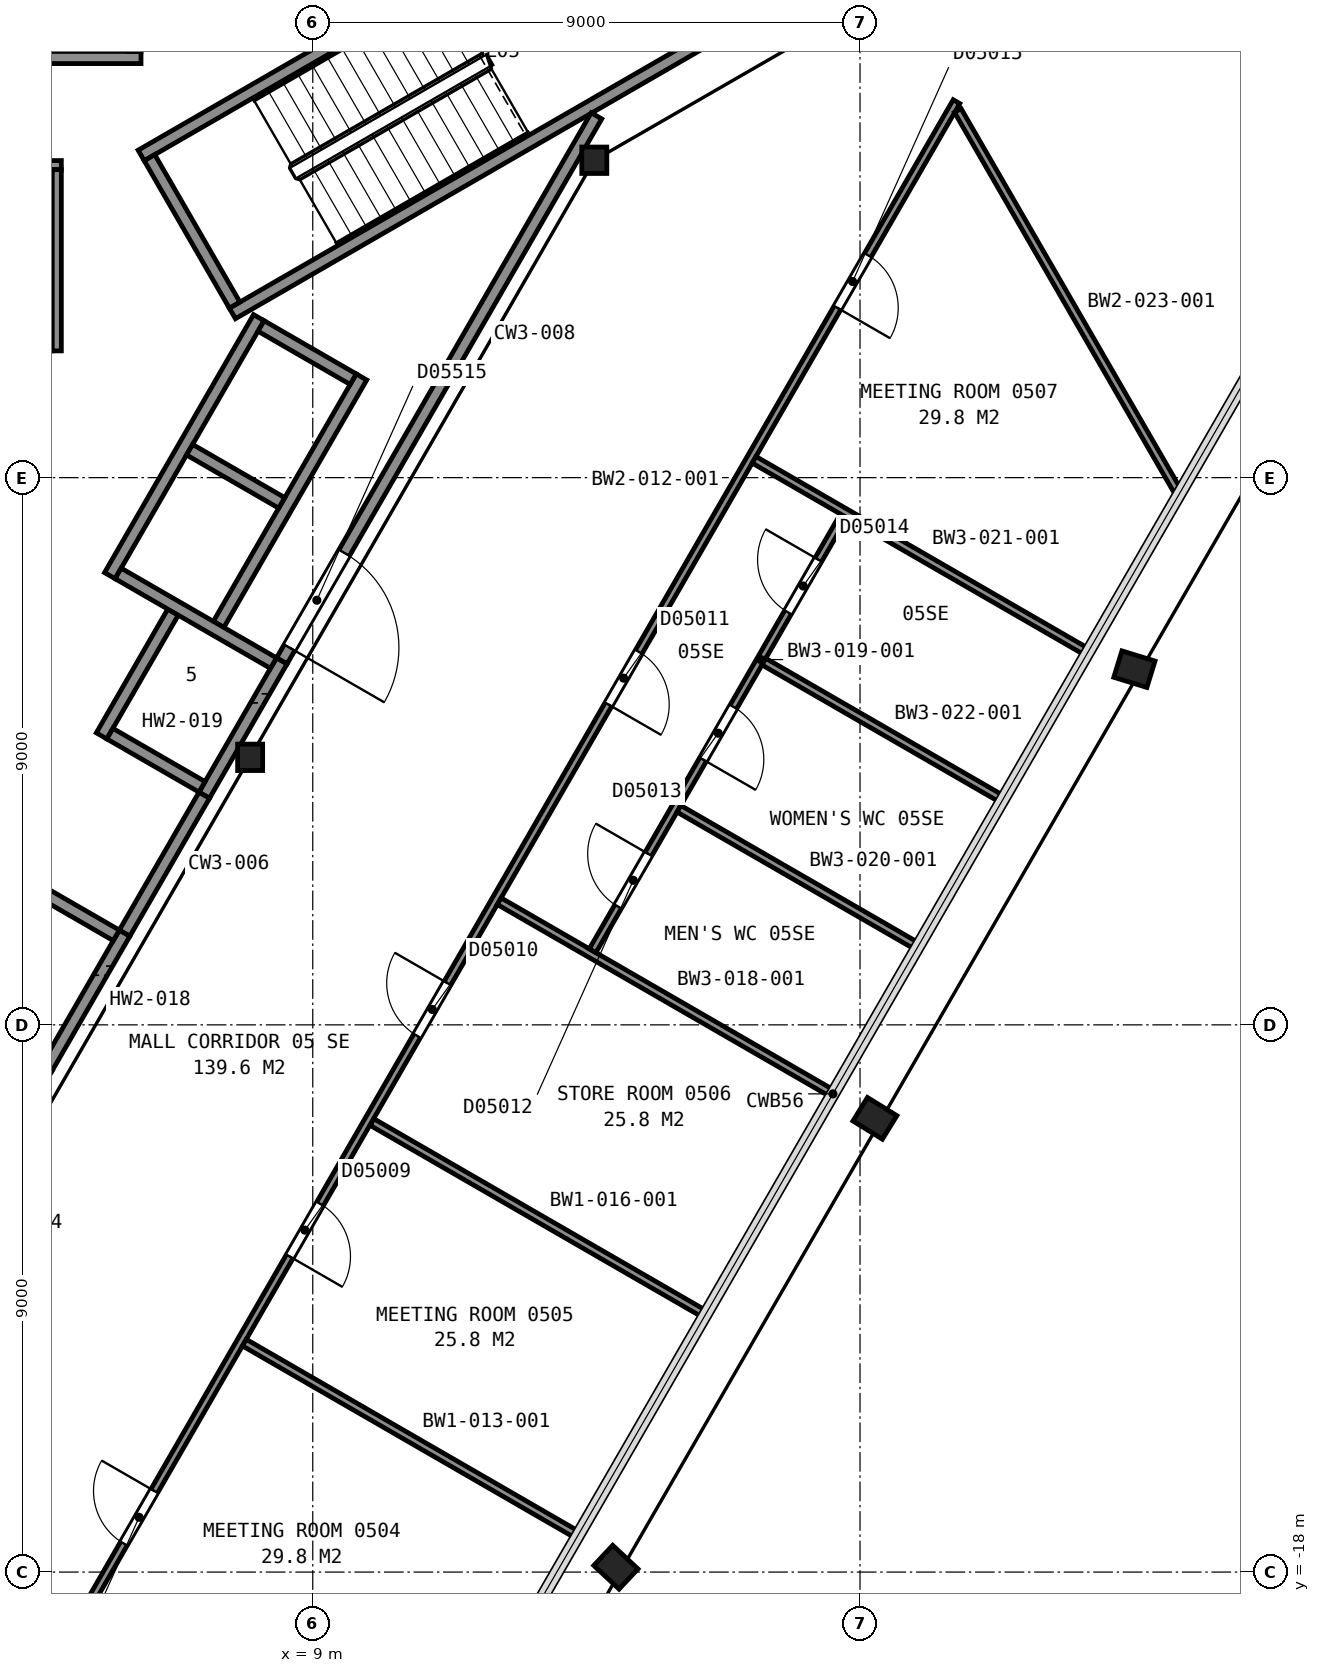
"""IFC4 building model, lengths in metres.
Left out: names, types, materials, properties, quantities, classifications, styles, units other than length and angle.
Written with IfcOpenShell. Run it as: python <this file> out.ifc"""

import sys

from ifc_helpers import new_model, si_unit, direction, frame, frame_2d, origin, origin_2d, place, context, subcontext, project, spatial, rectangle, i_section, extrude, element, fill, save


model = new_model("IFC4")
c1 = context("Model", 3, precision=1e-05, world=origin(), true_north=direction((0.0, 1.0)))
c2 = subcontext(c1, "Body", "Model", "MODEL_VIEW")
j1 = project(units=[si_unit("LENGTHUNIT", "METRE"), si_unit("PLANEANGLEUNIT", "RADIAN")], contexts=[c1])
p1 = place(None, origin())
s1 = spatial("IfcSite", under=j1, at=p1, CompositionType="ELEMENT")
p2 = place(p1, origin())
s2 = spatial("IfcBuilding", under=s1, at=p2, CompositionType="ELEMENT")
p3 = place(p2, frame((0.0, 0.0, 32.0)))
s3 = spatial("IfcBuildingStorey", under=s2, at=p3, CompositionType="ELEMENT", Elevation=32.0)
p4 = place(p3, frame((14.058, -17.989, 0.025), z_axis=(-0.062221812166, 0.058124902723, 0.996368376543), x_axis=(-0.500286642151, -0.865645685463, 0.019256763096)))
e1 = element("IfcColumn", 1, at=p4, inside=s3, PredefinedType="COLUMN", context=c2, shape_type="SweptSolid", body=[
    extrude(i_section(OverallWidth=0.455, OverallDepth=0.569, WebThickness=0.078, FlangeThickness=0.125, FilletRadius=0.015, at=origin_2d()), origin(), (0.0, 0.0, 1.0), 4.767),
])
p5 = place(p3, frame((18.328, -10.589, 0.025), z_axis=(-0.070582350376, 0.043588955131, 0.996553126936), x_axis=(-0.499945117104, -0.866053561357, 0.002471587651)))
e2 = element("IfcColumn", 2, at=p5, inside=s3, PredefinedType="COLUMN", context=c2, shape_type="SweptSolid", body=[
    extrude(i_section(OverallWidth=0.455, OverallDepth=0.569, WebThickness=0.078, FlangeThickness=0.125, FilletRadius=0.015, at=origin_2d()), origin(), (0.0, 0.0, 1.0), 4.766),
])
p6 = place(p3, frame((22.608, -3.179, 0.025), z_axis=(-0.080968116055, 0.024940842833, 0.996404595805), x_axis=(-0.500178646621, -0.865714310263, -0.018975101316)))
e3 = element("IfcColumn", 3, at=p6, inside=s3, PredefinedType="COLUMN", context=c2, shape_type="SweptSolid", body=[
    extrude(i_section(OverallWidth=0.455, OverallDepth=0.569, WebThickness=0.078, FlangeThickness=0.125, FilletRadius=0.015, at=origin_2d()), origin(), (0.0, 0.0, 1.0), 4.767),
])
for number, where, z_axis, x_axis in (
    (4, (13.63, 5.22, 0.0), (0.0, 0.0, 1.0), (1.0, 0.0, 0.0)),
    (5, (7.97, -4.6, 0.0), (0.0, 0.0, 1.0), (1.0, 0.0, 0.0)),
):
    element("IfcColumn", number, at=place(p3, frame(where, z_axis=z_axis, x_axis=x_axis)), inside=s3, PredefinedType="COLUMN", context=c2, shape_type="SweptSolid", body=[
        extrude(i_section(OverallWidth=0.411, OverallDepth=0.434, WebThickness=0.036, FlangeThickness=0.057, FilletRadius=0.015, at=origin_2d()), origin(), (0.0, 0.0, 1.0), 4.8),
    ])
for number, where, z_axis, x_axis in (
    (6, (6.178, 5.299, 0.0), (0.0, 0.0, 1.0), (0.866, 0.5, 0.0)),
    (7, (7.678, 2.701, 0.0), (0.0, 0.0, 1.0), (0.866, 0.5, 0.0)),
):
    element("IfcWall", number, at=place(p3, frame(where, z_axis=z_axis, x_axis=x_axis)), inside=s3, PredefinedType="PARTITIONING", context=c2, shape_type="SweptSolid", body=[
        extrude(rectangle(XDim=12.0, YDim=0.2, at=frame_2d((6.0, 0.0))), origin(), (0.0, 0.0, 1.0), 4.55),
    ])
p7 = place(p3, frame((7.715, 2.838, 0.0), z_axis=(0.0, 0.0, 1.0), x_axis=(-0.500049511043, 0.865996816683, 0.0)))
e8 = element("IfcWall", 8, at=p7, inside=s3, PredefinedType="PARTITIONING", context=c2, shape_type="SweptSolid", body=[
    extrude(rectangle(XDim=2.8, YDim=0.2, at=frame_2d((1.4, 0.0))), origin(), (0.0, 0.0, 1.0), 4.55),
])
for number, where, z_axis, x_axis in (
    (9, (3.625, 6.91, 0.0), (0.0, 0.0, 1.0), (1.0, 0.0, 0.0)),
    (10, (4.63, -9.7, 0.0), (0.0, 0.0, 1.0), (0.5, 0.866, 0.0)),
):
    element("IfcWall", number, at=place(p3, frame(where, z_axis=z_axis, x_axis=x_axis)), inside=s3, PredefinedType="PARTITIONING", context=c2, shape_type="SweptSolid", body=[
        extrude(rectangle(XDim=2.55, YDim=0.2, at=frame_2d((1.275, 0.0))), origin(), (0.0, 0.0, 1.0), 4.8),
    ])
p8 = place(p3, frame((7.216, -5.222, 0.0), z_axis=(0.0, 0.0, 1.0), x_axis=(0.499990435942, 0.866030925526, 0.0)))
e11 = element("IfcWall", 11, at=p8, inside=s3, PredefinedType="PARTITIONING", context=c2, shape_type="SweptSolid", body=[
    extrude(rectangle(XDim=2.55, YDim=0.2, at=frame_2d((1.275, 0.0))), origin(), (0.0, 0.0, 1.0), 4.8),
])
p9 = place(p3, frame((7.451, -2.414, 0.0), z_axis=(0.0, 0.0, 1.0), x_axis=(0.500016218704, 0.866016039709, 0.0)))
e12 = element("IfcWall", 12, at=p9, inside=s3, PredefinedType="PARTITIONING", context=c2, shape_type="SweptSolid", body=[
    extrude(rectangle(XDim=4.7, YDim=0.2, at=frame_2d((2.35, 0.0))), origin(), (0.0, 0.0, 1.0), 4.8),
])
p10 = place(p3, frame((5.527, -4.247, 0.0), z_axis=(0.0, 0.0, 1.0), x_axis=(0.499938297808, 0.866061024631, 0.0)))
e13 = element("IfcWall", 13, at=p10, inside=s3, PredefinedType="PARTITIONING", context=c2, shape_type="SweptSolid", body=[
    extrude(rectangle(XDim=2.35, YDim=0.2, at=frame_2d((1.175, 0.0))), origin(), (0.0, 0.0, 1.0), 4.8),
])
p11 = place(p3, frame((5.663, -1.612, 0.0), z_axis=(0.0, 0.0, 1.0), x_axis=(0.49998122708, 0.866036242063, 0.0)))
e14 = element("IfcWall", 14, at=p11, inside=s3, PredefinedType="PARTITIONING", context=c2, shape_type="SweptSolid", body=[
    extrude(rectangle(XDim=4.9, YDim=0.2, at=frame_2d((2.45, 0.0))), origin(), (0.0, 0.0, 1.0), 4.8),
])
p12 = place(p3, frame((9.665, 1.62, 0.0), z_axis=(0.0, 0.0, 1.0), x_axis=(-0.866002029911, 0.500040482552, 0.0)))
e15 = element("IfcWall", 15, at=p12, inside=s3, PredefinedType="PARTITIONING", context=c2, shape_type="SweptSolid", body=[
    extrude(rectangle(XDim=1.75, YDim=0.2, at=frame_2d((0.875, 0.0))), origin(), (0.0, 0.0, 1.0), 4.8),
])
p13 = place(p3, frame((8.49, -0.416, 0.0), z_axis=(0.0, 0.0, 1.0), x_axis=(-0.866036909293, 0.499980071345, 0.0)))
e16 = element("IfcWall", 16, at=p13, inside=s3, PredefinedType="PARTITIONING", context=c2, shape_type="SweptSolid", body=[
    extrude(rectangle(XDim=1.75, YDim=0.2, at=frame_2d((0.875, 0.0))), origin(), (0.0, 0.0, 1.0), 4.8),
])
p14 = place(p3, frame((8.354, -3.051, 0.0), z_axis=(0.0, 0.0, 1.0), x_axis=(-0.866060182126, 0.499939757307, 0.0)))
e17 = element("IfcWall", 17, at=p14, inside=s3, PredefinedType="PARTITIONING", context=c2, shape_type="SweptSolid", body=[
    extrude(rectangle(XDim=2.95, YDim=0.2, at=frame_2d((1.475, 0.0))), origin(), (0.0, 0.0, 1.0), 4.8),
])
p15 = place(p3, frame((7.179, -5.086, 0.0), z_axis=(0.0, 0.0, 1.0), x_axis=(-0.866036909293, 0.499980071345, 0.0)))
e18 = element("IfcWall", 18, at=p15, inside=s3, PredefinedType="PARTITIONING", context=c2, shape_type="SweptSolid", body=[
    extrude(rectangle(XDim=1.75, YDim=0.2, at=frame_2d((0.875, 0.0))), origin(), (0.0, 0.0, 1.0), 4.8),
])
p16 = place(p3, frame((5.769, -7.528, 0.0), z_axis=(0.0, 0.0, 1.0), x_axis=(-0.866002029911, 0.500040482552, 0.0)))
e19 = element("IfcWall", 19, at=p16, inside=s3, PredefinedType="PARTITIONING", context=c2, shape_type="SweptSolid", body=[
    extrude(rectangle(XDim=1.75, YDim=0.2, at=frame_2d((0.875, 0.0))), origin(), (0.0, 0.0, 1.0), 4.8),
])
p17 = place(p3, frame((-0.245, 5.14, 0.0), z_axis=(0.0, 0.0, 1.0), x_axis=(1.0, 0.0, 0.0)))
e20 = element("IfcWall", 20, at=p17, inside=s3, PredefinedType="PARTITIONING", context=c2, shape_type="SweptSolid", body=[
    extrude(rectangle(XDim=5.11, YDim=0.15, at=frame_2d((2.555, 0.0))), origin(), (0.0, 0.0, 1.0), 4.55),
])
p18 = place(p17, frame((1.975, 0.0, 0.0)))
e21 = element("IfcOpeningElement", 21, at=p18, cuts=e20, PredefinedType="OPENING", context=c2, shape_type="SweptSolid", body=[
    extrude(rectangle(XDim=1.0, YDim=2.1, at=frame_2d((0.5, 1.05))), frame((0.0, 0.085, 0.0), z_axis=(0.0, -1.0, 0.0), x_axis=(1.0, 0.0, 0.0)), (0.0, 0.0, 1.0), 0.17),
])
p19 = place(p3, frame((1.677, -14.815, 0.0), z_axis=(0.0, 0.0, 1.0), x_axis=(0.49999445743, 0.866028603765, 0.0)))
e22 = element("IfcWall", 22, at=p19, inside=s3, PredefinedType="PARTITIONING", context=c2, shape_type="SweptSolid", body=[
    extrude(rectangle(XDim=5.905, YDim=0.2, at=frame_2d((2.952, 0.0))), origin(), (0.0, 0.0, 1.0), 4.55),
])
p20 = place(p3, frame((4.477, 2.16, 0.0), z_axis=(0.0, 0.0, 1.0), x_axis=(1.0, 0.0, 0.0)))
e23 = element("IfcWall", 23, at=p20, inside=s3, PredefinedType="PARTITIONING", context=c2, shape_type="SweptSolid", body=[
    extrude(rectangle(XDim=0.238, YDim=0.15, at=frame_2d((0.119, 0.0))), origin(), (0.0, 0.0, 1.0), 4.55),
])
p21 = place(p3, frame((4.79, 2.085, 0.0), z_axis=(0.0, 0.0, 1.0), x_axis=(0.0, 1.0, 0.0)))
e24 = element("IfcWall", 24, at=p21, inside=s3, PredefinedType="PARTITIONING", context=c2, shape_type="SweptSolid", body=[
    extrude(rectangle(XDim=2.98, YDim=0.15, at=frame_2d((1.49, 0.0))), origin(), (0.0, 0.0, 1.0), 4.55),
])
p22 = place(p3, frame((5.906, -7.49, 0.0), z_axis=(0.0, 0.0, 1.0), x_axis=(0.500252727967, 0.865879442048, 0.0)))
e25 = element("IfcWall", 25, at=p22, inside=s3, PredefinedType="PARTITIONING", context=c2, shape_type="SweptSolid", body=[
    extrude(rectangle(XDim=2.617, YDim=0.2, at=frame_2d((1.309, 0.0))), origin(), (0.0, 0.0, 1.0), 4.55),
])
p23 = place(p3, frame((8.492, -3.012, 0.0), z_axis=(0.0, 0.0, 1.0), x_axis=(0.499972957231, 0.866041016371, 0.0)))
e26 = element("IfcWall", 26, at=p23, inside=s3, PredefinedType="PARTITIONING", context=c2, shape_type="SweptSolid", body=[
    extrude(rectangle(XDim=10.349, YDim=0.2, at=frame_2d((5.174, 0.0))), origin(), (0.0, 0.0, 1.0), 4.55),
])
p24 = place(p23, frame((0.25, 0.0, 0.0)))
e27 = element("IfcOpeningElement", 27, at=p24, cuts=e26, PredefinedType="OPENING", context=c2, shape_type="SweptSolid", body=[
    extrude(rectangle(XDim=1.8, YDim=2.1, at=frame_2d((0.9, 1.05))), frame((0.0, 0.11, 0.0), z_axis=(0.0, -1.0, 0.0), x_axis=(1.0, 0.0, 0.0)), (0.0, 0.0, 1.0), 0.22),
])
p25 = place(p3, frame((19.586, 6.184, 0.0), z_axis=(0.0, 0.0, 1.0), x_axis=(-0.499994028088, -0.866028851642, 0.0)))
e28 = element("IfcWall", 28, at=p25, inside=s3, PredefinedType="PARTITIONING", context=c2, shape_type="SweptSolid", body=[
    extrude(rectangle(XDim=30.297, YDim=0.125, at=frame_2d((15.148, 0.0))), origin(), (0.0, 0.0, 1.0), 3.793),
])
p26 = place(p25, frame((26.385, 0.0, 0.0)))
e29 = element("IfcOpeningElement", 29, at=p26, cuts=e28, PredefinedType="OPENING", context=c2, shape_type="SweptSolid", body=[
    extrude(rectangle(XDim=1.0, YDim=2.1, at=frame_2d((0.5, 1.05))), frame((0.0, 0.073, 0.0), z_axis=(0.0, -1.0, 0.0), x_axis=(1.0, 0.0, 0.0)), (0.0, 0.0, 1.0), 0.145),
])
p27 = place(p25, frame((20.932, 0.0, 0.0)))
e30 = element("IfcOpeningElement", 30, at=p27, cuts=e28, PredefinedType="OPENING", context=c2, shape_type="SweptSolid", body=[
    extrude(rectangle(XDim=1.0, YDim=2.1, at=frame_2d((0.5, 1.05))), frame((0.0, 0.073, 0.0), z_axis=(0.0, -1.0, 0.0), x_axis=(1.0, 0.0, 0.0)), (0.0, 0.0, 1.0), 0.145),
])
p28 = place(p25, frame((16.741, 0.0, 0.0)))
e31 = element("IfcOpeningElement", 31, at=p28, cuts=e28, PredefinedType="OPENING", context=c2, shape_type="SweptSolid", body=[
    extrude(rectangle(XDim=1.0, YDim=2.1, at=frame_2d((0.5, 1.05))), frame((0.0, 0.073, 0.0), z_axis=(0.0, -1.0, 0.0), x_axis=(1.0, 0.0, 0.0)), (0.0, 0.0, 1.0), 0.145),
])
p29 = place(p25, frame((10.449, 0.0, 0.0)))
e32 = element("IfcOpeningElement", 32, at=p29, cuts=e28, PredefinedType="OPENING", context=c2, shape_type="SweptSolid", body=[
    extrude(rectangle(XDim=1.0, YDim=2.1, at=frame_2d((0.5, 1.05))), frame((0.0, 0.073, 0.0), z_axis=(0.0, -1.0, 0.0), x_axis=(1.0, 0.0, 0.0)), (0.0, 0.0, 1.0), 0.145),
])
p30 = place(p25, frame((2.916, 0.0, 0.0)))
e33 = element("IfcOpeningElement", 33, at=p30, cuts=e28, PredefinedType="OPENING", context=c2, shape_type="SweptSolid", body=[
    extrude(rectangle(XDim=1.0, YDim=2.1, at=frame_2d((0.5, 1.05))), frame((0.0, 0.073, 0.0), z_axis=(0.0, -1.0, 0.0), x_axis=(1.0, 0.0, 0.0)), (0.0, 0.0, 1.0), 0.145),
])
p31 = place(p3, frame((7.875, -14.226, 0.0), z_axis=(0.0, 0.0, 1.0), x_axis=(0.866003371142, -0.500038159714, 0.0)))
e34 = element("IfcWall", 34, at=p31, inside=s3, PredefinedType="PARTITIONING", context=c2, shape_type="SweptSolid", body=[
    extrude(rectangle(XDim=6.337, YDim=0.125, at=frame_2d((3.168, 0.0))), origin(), (0.0, 0.0, 1.0), 3.793),
])
p32 = place(p3, frame((9.974, -10.599, 0.0), z_axis=(0.0, 0.0, 1.0), x_axis=(0.866044997331, -0.499966061446, 0.0)))
e35 = element("IfcWall", 35, at=p32, inside=s3, PredefinedType="PARTITIONING", context=c2, shape_type="SweptSolid", body=[
    extrude(rectangle(XDim=6.333, YDim=0.125, at=frame_2d((3.167, 0.0))), origin(), (0.0, 0.0, 1.0), 4.64),
])
p33 = place(p3, frame((12.066, -6.966, 0.0), z_axis=(0.0, 0.0, 1.0), x_axis=(0.866003371142, -0.500038159714, 0.0)))
e36 = element("IfcWall", 36, at=p33, inside=s3, PredefinedType="PARTITIONING", context=c2, shape_type="SweptSolid", body=[
    extrude(rectangle(XDim=6.337, YDim=0.125, at=frame_2d((3.168, 0.0))), origin(), (0.0, 0.0, 1.0), 3.793),
])
p34 = place(p3, frame((17.731, -0.629, 0.0), z_axis=(0.0, 0.0, 1.0), x_axis=(-0.499948523739, -0.866055121578, 0.0)))
e37 = element("IfcWall", 37, at=p34, inside=s3, PredefinedType="PARTITIONING", context=c2, shape_type="SweptSolid", body=[
    extrude(rectangle(XDim=8.258, YDim=0.125, at=frame_2d((4.129, 0.0))), origin(), (0.0, 0.0, 1.0), 4.64),
])
p35 = place(p34, frame((6.42, 0.0, 0.0)))
e38 = element("IfcOpeningElement", 38, at=p35, cuts=e37, PredefinedType="OPENING", context=c2, shape_type="SweptSolid", body=[
    extrude(rectangle(XDim=1.0, YDim=2.1, at=frame_2d((0.5, 1.05))), frame((0.0, 0.073, 0.0), z_axis=(0.0, -1.0, 0.0), x_axis=(1.0, 0.0, 0.0)), (0.0, 0.0, 1.0), 0.145),
])
p36 = place(p34, frame((3.626, 0.0, 0.0)))
e39 = element("IfcOpeningElement", 39, at=p36, cuts=e37, PredefinedType="OPENING", context=c2, shape_type="SweptSolid", body=[
    extrude(rectangle(XDim=1.0, YDim=2.1, at=frame_2d((0.5, 1.05))), frame((0.0, 0.073, 0.0), z_axis=(0.0, -1.0, 0.0), x_axis=(1.0, 0.0, 0.0)), (0.0, 0.0, 1.0), 0.145),
])
p37 = place(p34, frame((0.831, 0.0, 0.0)))
e40 = element("IfcOpeningElement", 40, at=p37, cuts=e37, PredefinedType="OPENING", context=c2, shape_type="SweptSolid", body=[
    extrude(rectangle(XDim=1.0, YDim=2.1, at=frame_2d((0.5, 1.05))), frame((0.0, 0.073, 0.0), z_axis=(0.0, -1.0, 0.0), x_axis=(1.0, 0.0, 0.0)), (0.0, 0.0, 1.0), 0.145),
])
p38 = place(p3, frame((15.022, -5.446, 0.0), z_axis=(0.0, 0.0, 1.0), x_axis=(0.866026101152, -0.499998792122, 0.0)))
e41 = element("IfcWall", 41, at=p38, inside=s3, PredefinedType="PARTITIONING", context=c2, shape_type="SweptSolid", body=[
    extrude(rectangle(XDim=4.538, YDim=0.125, at=frame_2d((2.269, 0.0))), origin(), (0.0, 0.0, 1.0), 4.64),
])
p39 = place(p3, frame((16.258, 0.294, 0.0), z_axis=(0.0, 0.0, 1.0), x_axis=(0.866013003808, -0.500021476775, 0.0)))
e42 = element("IfcWall", 42, at=p39, inside=s3, PredefinedType="PARTITIONING", context=c2, shape_type="SweptSolid", body=[
    extrude(rectangle(XDim=6.337, YDim=0.125, at=frame_2d((3.168, 0.0))), origin(), (0.0, 0.0, 1.0), 3.793),
])
p40 = place(p3, frame((16.419, -3.026, 0.0), z_axis=(0.0, 0.0, 1.0), x_axis=(0.866062846671, -0.499935141409, 0.0)))
e43 = element("IfcWall", 43, at=p40, inside=s3, PredefinedType="PARTITIONING", context=c2, shape_type="SweptSolid", body=[
    extrude(rectangle(XDim=4.538, YDim=0.125, at=frame_2d((2.269, 0.0))), origin(), (0.0, 0.0, 1.0), 4.64),
])
p41 = place(p3, frame((19.607, 6.039, 0.0), z_axis=(0.0, 0.0, 1.0), x_axis=(0.500002873931, -0.866023744513, 0.0)))
e44 = element("IfcWall", 44, at=p41, inside=s3, PredefinedType="PARTITIONING", context=c2, shape_type="SweptSolid", body=[
    extrude(rectangle(XDim=7.285, YDim=0.125, at=frame_2d((3.643, 0.0))), origin(), (0.0, 0.0, 1.0), 4.64),
])
p42 = place(p24, origin())
e45 = element("IfcDoor", 45, at=p42, inside=s3, OperationType="DOUBLE_DOOR_SINGLE_SWING", PredefinedType="DOOR", context=c2, shape_type="SweptSolid", body=[
    extrude(rectangle(XDim=1.8, YDim=2.1, at=frame_2d((0.9, 1.05))), frame((0.0, 0.025, 0.0), z_axis=(0.0, -1.0, 0.0), x_axis=(1.0, 0.0, 0.0)), (0.0, 0.0, 1.0), 0.05),
])
fill(e27, e45)
p43 = place(p26, origin())
e46 = element("IfcDoor", 46, at=p43, inside=s3, OperationType="SINGLE_SWING_LEFT", PredefinedType="DOOR", context=c2, shape_type="SweptSolid", body=[
    extrude(rectangle(XDim=1.0, YDim=2.1, at=frame_2d((0.5, 1.05))), frame((0.0, 0.025, 0.0), z_axis=(0.0, -1.0, 0.0), x_axis=(1.0, 0.0, 0.0)), (0.0, 0.0, 1.0), 0.05),
])
fill(e29, e46)
p44 = place(p27, origin())
e47 = element("IfcDoor", 47, at=p44, inside=s3, OperationType="SINGLE_SWING_RIGHT", PredefinedType="DOOR", context=c2, shape_type="SweptSolid", body=[
    extrude(rectangle(XDim=1.0, YDim=2.1, at=frame_2d((0.5, 1.05))), frame((0.0, 0.025, 0.0), z_axis=(0.0, -1.0, 0.0), x_axis=(1.0, 0.0, 0.0)), (0.0, 0.0, 1.0), 0.05),
])
fill(e30, e47)
p45 = place(p28, origin())
e48 = element("IfcDoor", 48, at=p45, inside=s3, OperationType="SINGLE_SWING_LEFT", PredefinedType="DOOR", context=c2, shape_type="SweptSolid", body=[
    extrude(rectangle(XDim=1.0, YDim=2.1, at=frame_2d((0.5, 1.05))), frame((0.0, 0.025, 0.0), z_axis=(0.0, -1.0, 0.0), x_axis=(1.0, 0.0, 0.0)), (0.0, 0.0, 1.0), 0.05),
])
fill(e31, e48)
p46 = place(p29, origin())
e49 = element("IfcDoor", 49, at=p46, inside=s3, OperationType="SINGLE_SWING_RIGHT", PredefinedType="DOOR", context=c2, shape_type="SweptSolid", body=[
    extrude(rectangle(XDim=1.0, YDim=2.1, at=frame_2d((0.5, 1.05))), frame((0.0, 0.025, 0.0), z_axis=(0.0, -1.0, 0.0), x_axis=(1.0, 0.0, 0.0)), (0.0, 0.0, 1.0), 0.05),
])
fill(e32, e49)
p47 = place(p30, origin())
e50 = element("IfcDoor", 50, at=p47, inside=s3, OperationType="SINGLE_SWING_RIGHT", PredefinedType="DOOR", context=c2, shape_type="SweptSolid", body=[
    extrude(rectangle(XDim=1.0, YDim=2.1, at=frame_2d((0.5, 1.05))), frame((0.0, 0.025, 0.0), z_axis=(0.0, -1.0, 0.0), x_axis=(1.0, 0.0, 0.0)), (0.0, 0.0, 1.0), 0.05),
])
fill(e33, e50)
p48 = place(p35, origin())
e51 = element("IfcDoor", 51, at=p48, inside=s3, OperationType="SINGLE_SWING_LEFT", PredefinedType="DOOR", context=c2, shape_type="SweptSolid", body=[
    extrude(rectangle(XDim=1.0, YDim=2.1, at=frame_2d((0.5, 1.05))), frame((0.0, 0.025, 0.0), z_axis=(0.0, -1.0, 0.0), x_axis=(1.0, 0.0, 0.0)), (0.0, 0.0, 1.0), 0.05),
])
fill(e38, e51)
p49 = place(p36, origin())
e52 = element("IfcDoor", 52, at=p49, inside=s3, OperationType="SINGLE_SWING_RIGHT", PredefinedType="DOOR", context=c2, shape_type="SweptSolid", body=[
    extrude(rectangle(XDim=1.0, YDim=2.1, at=frame_2d((0.5, 1.05))), frame((0.0, 0.025, 0.0), z_axis=(0.0, -1.0, 0.0), x_axis=(1.0, 0.0, 0.0)), (0.0, 0.0, 1.0), 0.05),
])
fill(e39, e52)
p50 = place(p37, origin())
e53 = element("IfcDoor", 53, at=p50, inside=s3, OperationType="SINGLE_SWING_LEFT", PredefinedType="DOOR", context=c2, shape_type="SweptSolid", body=[
    extrude(rectangle(XDim=1.0, YDim=2.1, at=frame_2d((0.5, 1.05))), frame((0.0, 0.025, 0.0), z_axis=(0.0, -1.0, 0.0), x_axis=(1.0, 0.0, 0.0)), (0.0, 0.0, 1.0), 0.05),
])
fill(e40, e53)
save(model, sys.argv[1])
